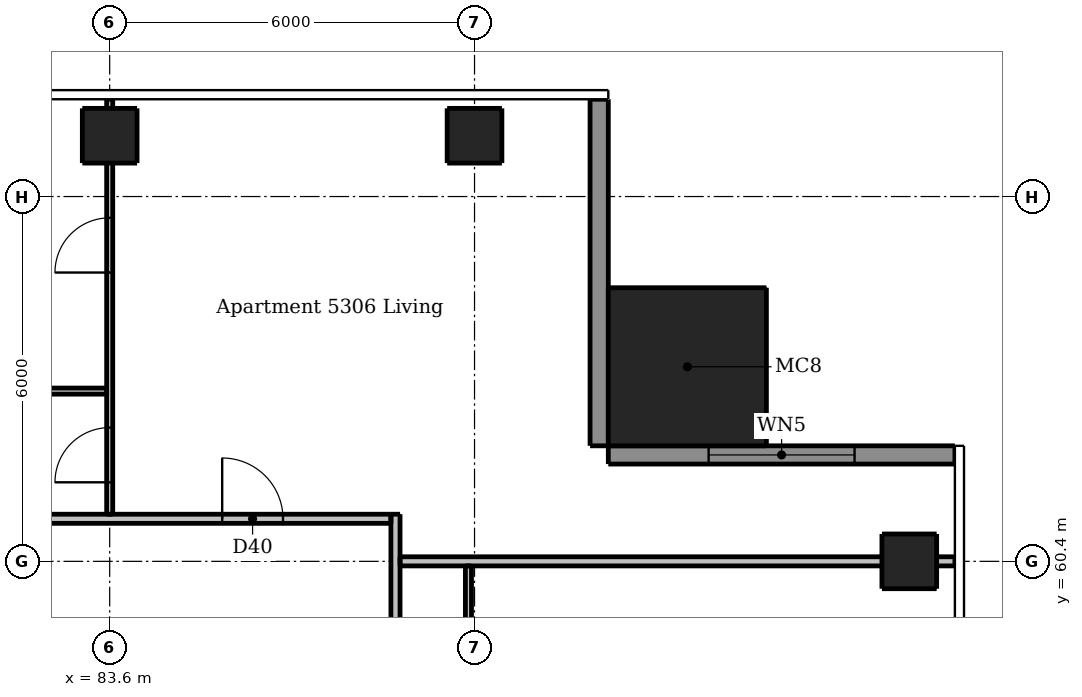
"""IFC4 building model, lengths in metres.
Left out: names, types, materials, properties, quantities, classifications, styles, units other than length and angle.
Written with IfcOpenShell. Run it as: python <this file> out.ifc"""

import sys

from ifc_helpers import new_model, si_unit, direction, frame, frame_2d, origin, origin_2d, place, context, subcontext, project, spatial, rectangle, extrude, element, fill, save


model = new_model("IFC4")
c1 = context("Model", 3, precision=1e-05, world=origin(), true_north=direction((0.0, 1.0)))
c2 = subcontext(c1, "Body", "Model", "MODEL_VIEW")
j1 = project(units=[si_unit("LENGTHUNIT", "METRE"), si_unit("PLANEANGLEUNIT", "RADIAN")], contexts=[c1])
p1 = place(None, origin())
s1 = spatial("IfcSite", under=j1, at=p1, CompositionType="ELEMENT")
p2 = place(p1, origin())
s2 = spatial("IfcBuilding", under=s1, at=p2, CompositionType="ELEMENT")
p3 = place(p2, frame((0.0, 0.0, 200.2)))
s3 = spatial("IfcBuildingStorey", under=s2, at=p3, CompositionType="ELEMENT", Elevation=200.2)
for number, where, z_axis, x_axis in (
    (1, (96.75, 60.4, 0.0), (0.0, 0.0, 1.0), (1.0, 0.0, 0.0)),
    (2, (83.6, 67.4, 0.0), (0.0, 0.0, 1.0), (1.0, 0.0, 0.0)),
    (3, (89.6, 67.4, 0.0), (0.0, 0.0, 1.0), (1.0, 0.0, 0.0)),
):
    element("IfcColumn", number, at=place(p3, frame(where, z_axis=z_axis, x_axis=x_axis)), inside=s3, PredefinedType="COLUMN", context=c2, shape_type="SweptSolid", body=[
        extrude(rectangle(XDim=0.9, YDim=0.9, at=origin_2d()), origin(), (0.0, 0.0, 1.0), 3.05),
    ])
p4 = place(p3, frame((93.1, 63.6, 0.0), z_axis=(0.0, 0.0, 1.0), x_axis=(1.0, 0.0, 0.0)))
e4 = element("IfcColumn", 4, at=p4, inside=s3, PredefinedType="COLUMN", context=c2, shape_type="SweptSolid", body=[
    extrude(rectangle(XDim=2.6, YDim=2.6, at=origin_2d()), origin(), (0.0, 0.0, 1.0), 3.3),
])
p5 = place(p3, frame((97.5, 62.15, 0.0), z_axis=(0.0, 0.0, 1.0), x_axis=(-1.0, 0.0, 0.0)))
e5 = element("IfcWall", 5, at=p5, inside=s3, PredefinedType="SOLIDWALL", context=c2, shape_type="SweptSolid", body=[
    extrude(rectangle(XDim=5.7, YDim=0.3, at=frame_2d((2.85, 0.0))), origin(), (0.0, 0.0, 1.0), 3.05),
])
p6 = place(p5, frame((1.65, 0.0, 0.15)))
e6 = element("IfcOpeningElement", 6, at=p6, cuts=e5, PredefinedType="OPENING", context=c2, shape_type="SweptSolid", body=[
    extrude(rectangle(XDim=2.4, YDim=2.1, at=frame_2d((1.2, 1.05))), frame((0.0, 0.16, 0.0), z_axis=(0.0, -1.0, 0.0), x_axis=(1.0, 0.0, 0.0)), (0.0, 0.0, 1.0), 0.32),
])
p7 = place(p3, frame((91.65, 62.3, 0.0), z_axis=(0.0, 0.0, 1.0), x_axis=(0.0, 1.0, 0.0)))
e7 = element("IfcWall", 7, at=p7, inside=s3, PredefinedType="SOLIDWALL", context=c2, shape_type="SweptSolid", body=[
    extrude(rectangle(XDim=5.7, YDim=0.3, at=frame_2d((2.85, 0.0))), origin(), (0.0, 0.0, 1.0), 3.05),
])
p8 = place(p3, frame((83.6, 61.175, 0.0), z_axis=(0.0, 0.0, 1.0), x_axis=(0.0, 1.0, 0.0)))
e8 = element("IfcWall", 8, at=p8, inside=s3, PredefinedType="PARTITIONING", context=c2, shape_type="SweptSolid", body=[
    extrude(rectangle(XDim=6.825, YDim=0.1, at=frame_2d((3.413, 0.0))), origin(), (0.0, 0.0, 1.0), 2.516),
])
p9 = place(p8, frame((0.525, 0.0, 0.0)))
e9 = element("IfcOpeningElement", 9, at=p9, cuts=e8, PredefinedType="OPENING", context=c2, shape_type="SweptSolid", body=[
    extrude(rectangle(XDim=0.9, YDim=2.1, at=frame_2d((0.45, 1.05))), frame((0.0, 0.06, 0.0), z_axis=(0.0, -1.0, 0.0), x_axis=(1.0, 0.0, 0.0)), (0.0, 0.0, 1.0), 0.12),
])
p10 = place(p8, frame((3.975, 0.0, 0.0)))
e10 = element("IfcOpeningElement", 10, at=p10, cuts=e8, PredefinedType="OPENING", context=c2, shape_type="SweptSolid", body=[
    extrude(rectangle(XDim=0.9, YDim=2.1, at=frame_2d((0.45, 1.05))), frame((0.0, 0.06, 0.0), z_axis=(0.0, -1.0, 0.0), x_axis=(1.0, 0.0, 0.0)), (0.0, 0.0, 1.0), 0.12),
])
p11 = place(p3, frame((89.5, 60.325, 0.0), z_axis=(0.0, 0.0, 1.0), x_axis=(0.0, -1.0, 0.0)))
e11 = element("IfcWall", 11, at=p11, inside=s3, PredefinedType="PARTITIONING", context=c2, shape_type="SweptSolid", body=[
    extrude(rectangle(XDim=20.85, YDim=0.1, at=frame_2d((10.425, 0.0))), origin(), (0.0, 0.0, 1.0), 2.51),
])
p12 = place(p11, frame((10.575, 0.0, 0.0)))
e12 = element("IfcOpeningElement", 12, at=p12, cuts=e11, PredefinedType="OPENING", context=c2, shape_type="SweptSolid", body=[
    extrude(rectangle(XDim=0.9, YDim=2.1, at=frame_2d((0.45, 1.05))), frame((0.0, 0.06, 0.0), z_axis=(0.0, -1.0, 0.0), x_axis=(1.0, 0.0, 0.0)), (0.0, 0.0, 1.0), 0.12),
])
p13 = place(p11, frame((6.675, 0.0, 0.0)))
e13 = element("IfcOpeningElement", 13, at=p13, cuts=e11, PredefinedType="OPENING", context=c2, shape_type="SweptSolid", body=[
    extrude(rectangle(XDim=0.9, YDim=2.1, at=frame_2d((0.45, 1.05))), frame((0.0, 0.06, 0.0), z_axis=(0.0, -1.0, 0.0), x_axis=(1.0, 0.0, 0.0)), (0.0, 0.0, 1.0), 0.12),
])
p14 = place(p11, frame((8.775, 0.0, 0.0)))
e14 = element("IfcOpeningElement", 14, at=p14, cuts=e11, PredefinedType="OPENING", context=c2, shape_type="SweptSolid", body=[
    extrude(rectangle(XDim=0.9, YDim=2.1, at=frame_2d((0.45, 1.05))), frame((0.0, 0.06, 0.0), z_axis=(0.0, -1.0, 0.0), x_axis=(1.0, 0.0, 0.0)), (0.0, 0.0, 1.0), 0.12),
])
p15 = place(p11, frame((19.075, 0.0, 0.0)))
e15 = element("IfcOpeningElement", 15, at=p15, cuts=e11, PredefinedType="OPENING", context=c2, shape_type="SweptSolid", body=[
    extrude(rectangle(XDim=0.9, YDim=2.1, at=frame_2d((0.45, 1.05))), frame((0.0, 0.06, 0.0), z_axis=(0.0, -1.0, 0.0), x_axis=(1.0, 0.0, 0.0)), (0.0, 0.0, 1.0), 0.12),
])
p16 = place(p11, frame((15.775, 0.0, 0.0)))
e16 = element("IfcOpeningElement", 16, at=p16, cuts=e11, PredefinedType="OPENING", context=c2, shape_type="SweptSolid", body=[
    extrude(rectangle(XDim=0.9, YDim=2.1, at=frame_2d((0.45, 1.05))), frame((0.0, 0.06, 0.0), z_axis=(0.0, -1.0, 0.0), x_axis=(1.0, 0.0, 0.0)), (0.0, 0.0, 1.0), 0.12),
])
p17 = place(p11, frame((1.275, 0.0, 0.0)))
e17 = element("IfcOpeningElement", 17, at=p17, cuts=e11, PredefinedType="OPENING", context=c2, shape_type="SweptSolid", body=[
    extrude(rectangle(XDim=0.9, YDim=2.1, at=frame_2d((0.45, 1.05))), frame((0.0, 0.06, 0.0), z_axis=(0.0, -1.0, 0.0), x_axis=(1.0, 0.0, 0.0)), (0.0, 0.0, 1.0), 0.12),
])
p18 = place(p11, frame((12.725, 0.0, 0.0)))
e18 = element("IfcOpeningElement", 18, at=p18, cuts=e11, PredefinedType="OPENING", context=c2, shape_type="SweptSolid", body=[
    extrude(rectangle(XDim=0.8, YDim=2.1, at=frame_2d((0.4, 1.05))), frame((0.0, 0.06, 0.0), z_axis=(0.0, -1.0, 0.0), x_axis=(1.0, 0.0, 0.0)), (0.0, 0.0, 1.0), 0.12),
])
p19 = place(p11, frame((4.325, 0.0, 0.0)))
e19 = element("IfcOpeningElement", 19, at=p19, cuts=e11, PredefinedType="OPENING", context=c2, shape_type="SweptSolid", body=[
    extrude(rectangle(XDim=0.8, YDim=2.1, at=frame_2d((0.4, 1.05))), frame((0.0, 0.06, 0.0), z_axis=(0.0, -1.0, 0.0), x_axis=(1.0, 0.0, 0.0)), (0.0, 0.0, 1.0), 0.12),
])
p20 = place(p3, frame((83.55, 63.2, 0.0), z_axis=(0.0, 0.0, 1.0), x_axis=(-1.0, 0.0, 0.0)))
e20 = element("IfcWall", 20, at=p20, inside=s3, PredefinedType="PARTITIONING", context=c2, shape_type="SweptSolid", body=[
    extrude(rectangle(XDim=5.875, YDim=0.1, at=frame_2d((2.938, 0.0))), origin(), (0.0, 0.0, 1.0), 3.05),
])
p21 = place(p20, frame((3.75, 0.0, 0.0)))
e21 = element("IfcOpeningElement", 21, at=p21, cuts=e20, PredefinedType="OPENING", context=c2, shape_type="SweptSolid", body=[
    extrude(rectangle(XDim=0.8, YDim=2.1, at=frame_2d((0.4, 1.05))), frame((0.0, 0.06, 0.0), z_axis=(0.0, -1.0, 0.0), x_axis=(1.0, 0.0, 0.0)), (0.0, 0.0, 1.0), 0.12),
])
p22 = place(p3, frame((88.3, 61.175, 0.0), z_axis=(0.0, 0.0, 1.0), x_axis=(0.0, -1.0, 0.0)))
e22 = element("IfcWall", 22, at=p22, inside=s3, PredefinedType="PARTITIONING", context=c2, shape_type="SweptSolid", body=[
    extrude(rectangle(XDim=29.4, YDim=0.15, at=frame_2d((14.7, 0.0))), origin(), (0.0, 0.0, 1.0), 3.05),
])
p23 = place(p22, frame((28.125, 0.0, 0.0)))
e23 = element("IfcOpeningElement", 23, at=p23, cuts=e22, PredefinedType="OPENING", context=c2, shape_type="SweptSolid", body=[
    extrude(rectangle(XDim=1.0, YDim=2.1, at=frame_2d((0.5, 1.05))), frame((0.0, 0.085, 0.0), z_axis=(0.0, -1.0, 0.0), x_axis=(1.0, 0.0, 0.0)), (0.0, 0.0, 1.0), 0.17),
])
p24 = place(p22, frame((10.775, 0.0, 0.0)))
e24 = element("IfcOpeningElement", 24, at=p24, cuts=e22, PredefinedType="OPENING", context=c2, shape_type="SweptSolid", body=[
    extrude(rectangle(XDim=1.0, YDim=2.1, at=frame_2d((0.5, 1.05))), frame((0.0, 0.085, 0.0), z_axis=(0.0, -1.0, 0.0), x_axis=(1.0, 0.0, 0.0)), (0.0, 0.0, 1.0), 0.17),
])
p25 = place(p3, frame((58.975, 61.1, 0.0), z_axis=(0.0, 0.0, 1.0), x_axis=(1.0, 0.0, 0.0)))
e25 = element("IfcWall", 25, at=p25, inside=s3, PredefinedType="PARTITIONING", context=c2, shape_type="SweptSolid", body=[
    extrude(rectangle(XDim=29.25, YDim=0.15, at=frame_2d((14.625, 0.0))), origin(), (0.0, 0.0, 1.0), 3.05),
])
p26 = place(p25, frame((7.925, 0.0, 0.0)))
e26 = element("IfcOpeningElement", 26, at=p26, cuts=e25, PredefinedType="OPENING", context=c2, shape_type="SweptSolid", body=[
    extrude(rectangle(XDim=1.0, YDim=2.1, at=frame_2d((0.5, 1.05))), frame((0.0, 0.085, 0.0), z_axis=(0.0, -1.0, 0.0), x_axis=(1.0, 0.0, 0.0)), (0.0, 0.0, 1.0), 0.17),
])
p27 = place(p25, frame((26.475, 0.0, 0.0)))
e27 = element("IfcOpeningElement", 27, at=p27, cuts=e25, PredefinedType="OPENING", context=c2, shape_type="SweptSolid", body=[
    extrude(rectangle(XDim=1.0, YDim=2.1, at=frame_2d((0.5, 1.05))), frame((0.0, 0.085, 0.0), z_axis=(0.0, -1.0, 0.0), x_axis=(1.0, 0.0, 0.0)), (0.0, 0.0, 1.0), 0.17),
])
p28 = place(p3, frame((88.375, 60.4, 0.0), z_axis=(0.0, 0.0, 1.0), x_axis=(1.0, 0.0, 0.0)))
e28 = element("IfcWall", 28, at=p28, inside=s3, PredefinedType="PARTITIONING", context=c2, shape_type="SweptSolid", body=[
    extrude(rectangle(XDim=9.125, YDim=0.15, at=frame_2d((4.562, 0.0))), origin(), (0.0, 0.0, 1.0), 2.59),
])
p29 = place(p6, origin())
e29 = element("IfcWindow", 29, at=p29, inside=s3, PartitioningType="DOUBLE_PANEL_VERTICAL", PredefinedType="WINDOW", context=c2, shape_type="SweptSolid", body=[
    extrude(rectangle(XDim=2.4, YDim=2.1, at=frame_2d((1.2, 1.05))), frame((0.0, 0.03, 0.0), z_axis=(0.0, -1.0, 0.0), x_axis=(1.0, 0.0, 0.0)), (0.0, 0.0, 1.0), 0.06),
])
fill(e6, e29)
p30 = place(p27, origin())
e30 = element("IfcDoor", 30, at=p30, inside=s3, OperationType="SINGLE_SWING_LEFT", PredefinedType="DOOR", context=c2, shape_type="SweptSolid", body=[
    extrude(rectangle(XDim=1.0, YDim=2.1, at=frame_2d((0.5, 1.05))), frame((0.0, 0.025, 0.0), z_axis=(0.0, -1.0, 0.0), x_axis=(1.0, 0.0, 0.0)), (0.0, 0.0, 1.0), 0.05),
])
fill(e27, e30)
p31 = place(p9, origin())
e31 = element("IfcDoor", 31, at=p31, inside=s3, OperationType="SINGLE_SWING_LEFT", PredefinedType="DOOR", context=c2, shape_type="SweptSolid", body=[
    extrude(rectangle(XDim=0.9, YDim=2.1, at=frame_2d((0.45, 1.05))), frame((0.0, 0.025, 0.0), z_axis=(0.0, -1.0, 0.0), x_axis=(1.0, 0.0, 0.0)), (0.0, 0.0, 1.0), 0.05),
])
fill(e9, e31)
p32 = place(p10, origin())
e32 = element("IfcDoor", 32, at=p32, inside=s3, OperationType="SINGLE_SWING_LEFT", PredefinedType="DOOR", context=c2, shape_type="SweptSolid", body=[
    extrude(rectangle(XDim=0.9, YDim=2.1, at=frame_2d((0.45, 1.05))), frame((0.0, 0.025, 0.0), z_axis=(0.0, -1.0, 0.0), x_axis=(1.0, 0.0, 0.0)), (0.0, 0.0, 1.0), 0.05),
])
fill(e10, e32)
save(model, sys.argv[1])
